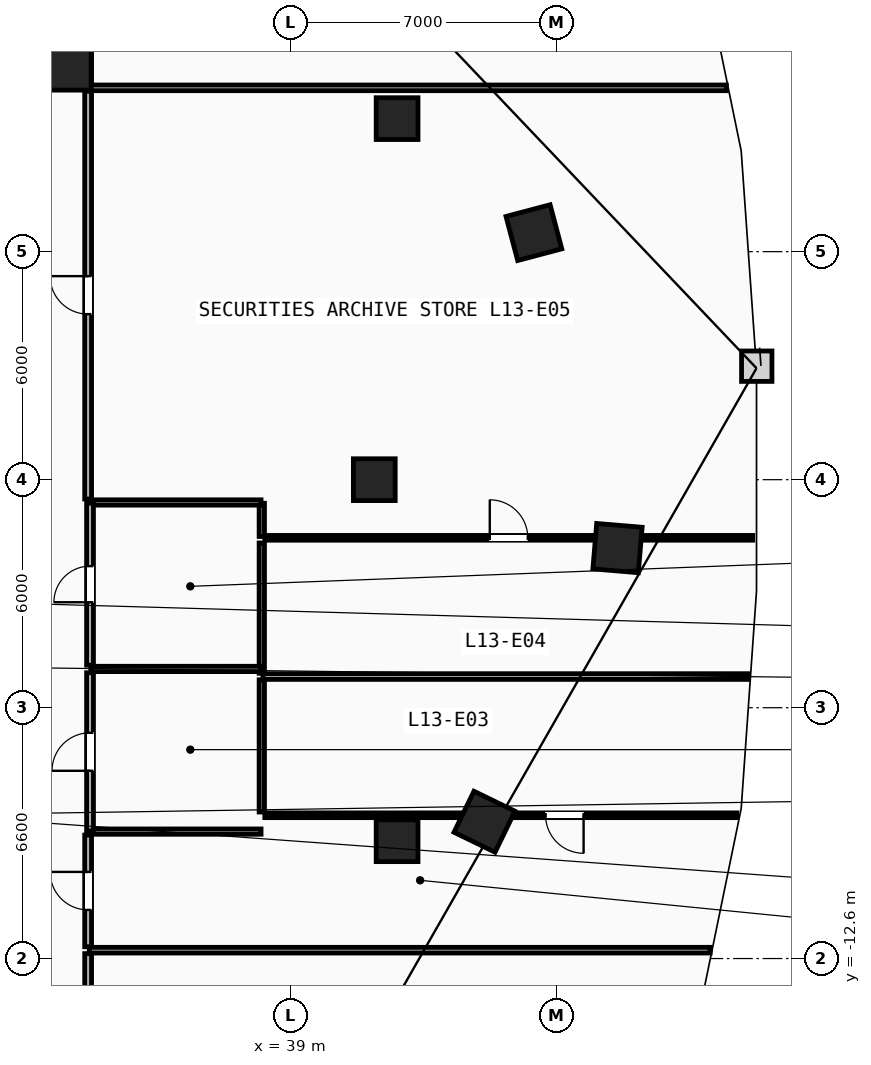
"""IFC4 building model, lengths in metres.
Left out: names, types, materials, properties, quantities, classifications, styles, units other than length and angle.
Written with IfcOpenShell. Run it as: python <this file> out.ifc"""

import sys

from ifc_helpers import new_model, si_unit, direction, frame, frame_2d, origin, origin_2d, place, context, subcontext, project, spatial, rectangle, extrude, element, fill, save


model = new_model("IFC4")
c1 = context("Model", 3, precision=1e-05, world=origin(), true_north=direction((0.0, 1.0)))
c2 = subcontext(c1, "Body", "Model", "MODEL_VIEW")
j1 = project(units=[si_unit("LENGTHUNIT", "METRE"), si_unit("PLANEANGLEUNIT", "RADIAN")], contexts=[c1])
p1 = place(None, origin())
s1 = spatial("IfcSite", under=j1, at=p1, CompositionType="ELEMENT")
p2 = place(p1, origin())
s2 = spatial("IfcBuilding", under=s1, at=p2, CompositionType="ELEMENT")
p3 = place(p2, frame((0.0, 0.0, 54.4)))
s3 = spatial("IfcBuildingStorey", under=s2, at=p3, CompositionType="ELEMENT", Elevation=54.4)
for number, where, z_axis, x_axis in (
    (1, (41.2, 0.0, 0.0), (0.0, 0.0, 1.0), (1.0, 0.0, 0.0)),
    (2, (41.8, -9.5, 0.0), (0.0, 0.0, 1.0), (1.0, 0.0, 0.0)),
    (3, (41.8, 9.5, 0.0), (0.0, 0.0, 1.0), (1.0, 0.0, 0.0)),
    (4, (33.2, 10.8, 0.0), (0.0, 0.0, 1.0), (1.0, 0.0, 0.0)),
):
    element("IfcColumn", number, at=place(p3, frame(where, z_axis=z_axis, x_axis=x_axis)), inside=s3, PredefinedType="COLUMN", context=c2, shape_type="SweptSolid", body=[
        extrude(rectangle(XDim=1.1, YDim=1.1, at=origin_2d()), origin(), (0.0, 0.0, 1.0), 3.8),
    ])
for number, where, z_axis, x_axis in (
    (5, (44.1, -9.0, 0.0), (0.0, 0.0, 1.0), (0.437, 0.899, 0.0)),
    (6, (47.6, -1.8, 0.0), (0.0, 0.0, 1.0), (0.084, 0.997, 0.0)),
    (7, (45.4, 6.5, 0.0), (0.0, 0.0, 1.0), (-0.256, 0.967, 0.0)),
):
    element("IfcColumn", number, at=place(p3, frame(where, z_axis=z_axis, x_axis=x_axis)), inside=s3, PredefinedType="COLUMN", context=c2, shape_type="SweptSolid", body=[
        extrude(rectangle(XDim=1.2, YDim=1.2, at=origin_2d()), origin(), (0.0, 0.0, 1.0), 3.8),
    ])
p4 = place(p3, frame((38.24, -8.745, 0.0), z_axis=(0.0, 0.0, 1.0), x_axis=(0.0, 1.0, 0.0)))
e8 = element("IfcWall", 8, at=p4, inside=s3, PredefinedType="PARTITIONING", context=c2, shape_type="SweptSolid", body=[
    extrude(rectangle(XDim=3.48, YDim=0.14, at=frame_2d((1.74, 0.0))), origin(), (0.0, 0.0, 1.0), 3.5),
])
p5 = place(p3, frame((38.24, -5.095, 0.0), z_axis=(0.0, 0.0, 1.0), x_axis=(0.0, 1.0, 0.0)))
e9 = element("IfcWall", 9, at=p5, inside=s3, PredefinedType="PARTITIONING", context=c2, shape_type="SweptSolid", body=[
    extrude(rectangle(XDim=3.43, YDim=0.14, at=frame_2d((1.715, 0.0))), origin(), (0.0, 0.0, 1.0), 3.5),
])
p6 = place(p3, frame((38.24, -1.495, 0.0), z_axis=(0.0, 0.0, 1.0), x_axis=(0.0, 1.0, 0.0)))
e10 = element("IfcWall", 10, at=p6, inside=s3, PredefinedType="PARTITIONING", context=c2, shape_type="SweptSolid", body=[
    extrude(rectangle(XDim=0.875, YDim=0.14, at=frame_2d((0.438, 0.0))), origin(), (0.0, 0.0, 1.0), 3.5),
])
for number, where, z_axis, x_axis in (
    (11, (33.74, -0.6, 0.0), (0.0, 0.0, 1.0), (1.0, 0.0, 0.0)),
    (12, (33.74, -4.98, 0.0), (0.0, 0.0, 1.0), (1.0, 0.0, 0.0)),
    (13, (33.74, -9.26, 0.0), (0.0, 0.0, 1.0), (1.0, 0.0, 0.0)),
):
    element("IfcWall", number, at=place(p3, frame(where, z_axis=z_axis, x_axis=x_axis)), inside=s3, PredefinedType="PARTITIONING", context=c2, shape_type="SweptSolid", body=[
        extrude(rectangle(XDim=4.48, YDim=0.14, at=frame_2d((2.24, 0.0))), origin(), (0.0, 0.0, 1.0), 3.5),
    ])
p7 = place(p3, frame((33.72, -4.88, 0.0), z_axis=(0.0, 0.0, 1.0), x_axis=(0.0, 1.0, 0.0)))
e14 = element("IfcWall", 14, at=p7, inside=s3, PredefinedType="PARTITIONING", context=c2, shape_type="SweptSolid", body=[
    extrude(rectangle(XDim=4.26, YDim=0.18, at=frame_2d((2.13, 0.0))), origin(), (0.0, 0.0, 1.0), 3.5),
])
p8 = place(p7, frame((1.655, 0.0, 0.0)))
e15 = element("IfcOpeningElement", 15, at=p8, cuts=e14, PredefinedType="OPENING", context=c2, shape_type="SweptSolid", body=[
    extrude(rectangle(XDim=0.95, YDim=2.1, at=frame_2d((0.475, 1.05))), frame((0.0, 0.1, 0.0), z_axis=(0.0, -1.0, 0.0), x_axis=(1.0, 0.0, 0.0)), (0.0, 0.0, 1.0), 0.2),
])
p9 = place(p3, frame((33.72, -9.24, 0.0), z_axis=(0.0, 0.0, 1.0), x_axis=(0.0, 1.0, 0.0)))
e16 = element("IfcWall", 16, at=p9, inside=s3, PredefinedType="PARTITIONING", context=c2, shape_type="SweptSolid", body=[
    extrude(rectangle(XDim=4.16, YDim=0.18, at=frame_2d((2.08, 0.0))), origin(), (0.0, 0.0, 1.0), 3.5),
])
p10 = place(p9, frame((1.58, 0.0, 0.0)))
e17 = element("IfcOpeningElement", 17, at=p10, cuts=e16, PredefinedType="OPENING", context=c2, shape_type="SweptSolid", body=[
    extrude(rectangle(XDim=1.0, YDim=2.15, at=frame_2d((0.5, 1.075))), frame((0.0, 0.1, 0.0), z_axis=(0.0, -1.0, 0.0), x_axis=(1.0, 0.0, 0.0)), (0.0, 0.0, 1.0), 0.2),
])
p11 = place(p3, frame((33.7, 10.31, 0.0), z_axis=(0.0, 0.0, 1.0), x_axis=(1.0, 0.0, 0.0)))
e18 = element("IfcWall", 18, at=p11, inside=s3, PredefinedType="PARTITIONING", context=c2, shape_type="SweptSolid", body=[
    extrude(rectangle(XDim=16.764, YDim=0.15, at=frame_2d((8.382, 0.0))), origin(), (0.0, 0.0, 1.0), 2.805),
])
p12 = place(p3, frame((38.27, -5.18, 0.0), z_axis=(0.0, 0.0, 1.0), x_axis=(1.0, 0.0, 0.0)))
e19 = element("IfcWall", 19, at=p12, inside=s3, PredefinedType="PARTITIONING", context=c2, shape_type="SweptSolid", body=[
    extrude(rectangle(XDim=12.78, YDim=0.15, at=frame_2d((6.39, 0.0))), origin(), (0.0, 0.0, 1.0), 3.5),
])
p13 = place(p3, frame((33.7, -12.38, 0.0), z_axis=(0.0, 0.0, 1.0), x_axis=(1.0, 0.0, 0.0)))
e20 = element("IfcWall", 20, at=p13, inside=s3, PredefinedType="PARTITIONING", context=c2, shape_type="SweptSolid", body=[
    extrude(rectangle(XDim=16.338, YDim=0.15, at=frame_2d((8.169, 0.0))), origin(), (0.0, 0.0, 1.0), 3.5),
])
p14 = place(p3, frame((33.67, -12.29, 0.0), z_axis=(0.0, 0.0, 1.0), x_axis=(0.0, 1.0, 0.0)))
e21 = element("IfcWall", 21, at=p14, inside=s3, PredefinedType="PARTITIONING", context=c2, shape_type="SweptSolid", body=[
    extrude(rectangle(XDim=2.939, YDim=0.18, at=frame_2d((1.469, 0.0))), origin(), (0.0, 0.0, 1.0), 3.5),
])
p15 = place(p14, frame((0.969, 0.0, 0.0)))
e22 = element("IfcOpeningElement", 22, at=p15, cuts=e21, PredefinedType="OPENING", context=c2, shape_type="SweptSolid", body=[
    extrude(rectangle(XDim=1.0, YDim=2.15, at=frame_2d((0.5, 1.075))), frame((0.0, 0.1, 0.0), z_axis=(0.0, -1.0, 0.0), x_axis=(1.0, 0.0, 0.0)), (0.0, 0.0, 1.0), 0.2),
])
p16 = place(p3, frame((33.67, -17.428, 0.0), z_axis=(0.0, 0.0, 1.0), x_axis=(0.0, 1.0, 0.0)))
e23 = element("IfcWall", 23, at=p16, inside=s3, PredefinedType="PARTITIONING", context=c2, shape_type="SweptSolid", body=[
    extrude(rectangle(XDim=4.958, YDim=0.18, at=frame_2d((2.479, 0.0))), origin(), (0.0, 0.0, 1.0), 3.5),
])
p17 = place(p3, frame((33.67, -0.509, 0.0), z_axis=(0.0, 0.0, 1.0), x_axis=(0.0, 1.0, 0.0)))
e24 = element("IfcWall", 24, at=p17, inside=s3, PredefinedType="PARTITIONING", context=c2, shape_type="SweptSolid", body=[
    extrude(rectangle(XDim=10.729, YDim=0.18, at=frame_2d((5.364, 0.0))), origin(), (0.0, 0.0, 1.0), 3.5),
])
p18 = place(p17, frame((4.864, 0.0, 0.0)))
e25 = element("IfcOpeningElement", 25, at=p18, cuts=e24, PredefinedType="OPENING", context=c2, shape_type="SweptSolid", body=[
    extrude(rectangle(XDim=1.0, YDim=2.15, at=frame_2d((0.5, 1.075))), frame((0.0, 0.1, 0.0), z_axis=(0.0, -1.0, 0.0), x_axis=(1.0, 0.0, 0.0)), (0.0, 0.0, 1.0), 0.2),
])
p19 = place(p3, frame((33.67, 10.4, 0.0), z_axis=(0.0, 0.0, 1.0), x_axis=(0.0, 1.0, 0.0)))
e26 = element("IfcWall", 26, at=p19, inside=s3, PredefinedType="PARTITIONING", context=c2, shape_type="SweptSolid", body=[
    extrude(rectangle(XDim=1.0, YDim=0.18, at=frame_2d((0.5, 0.0))), origin(), (0.0, 0.0, 1.0), 3.5),
])
p20 = place(p3, frame((50.742, -8.83, 0.0), z_axis=(0.0, 0.0, 1.0), x_axis=(-1.0, 0.0, 0.0)))
e27 = element("IfcWall", 27, at=p20, inside=s3, PredefinedType="PARTITIONING", context=c2, shape_type="SweptSolid", body=[
    extrude(rectangle(XDim=12.422, YDim=0.125, at=frame_2d((6.211, 0.0))), origin(), (0.0, 0.0, 1.0), 3.5),
])
p21 = place(p20, frame((4.034, 0.0, 0.0)))
e28 = element("IfcOpeningElement", 28, at=p21, cuts=e27, PredefinedType="OPENING", context=c2, shape_type="SweptSolid", body=[
    extrude(rectangle(XDim=1.0, YDim=2.15, at=frame_2d((0.5, 1.075))), frame((0.0, 0.073, 0.0), z_axis=(0.0, -1.0, 0.0), x_axis=(1.0, 0.0, 0.0)), (0.0, 0.0, 1.0), 0.145),
])
p22 = place(p3, frame((38.32, -1.53, 0.0), z_axis=(0.0, 0.0, 1.0), x_axis=(1.0, 0.0, 0.0)))
e29 = element("IfcWall", 29, at=p22, inside=s3, PredefinedType="PARTITIONING", context=c2, shape_type="SweptSolid", body=[
    extrude(rectangle(XDim=12.838, YDim=0.125, at=frame_2d((6.419, 0.0))), origin(), (0.0, 0.0, 1.0), 2.967),
])
p23 = place(p22, frame((5.919, 0.0, 0.0)))
e30 = element("IfcOpeningElement", 30, at=p23, cuts=e29, PredefinedType="OPENING", context=c2, shape_type="SweptSolid", body=[
    extrude(rectangle(XDim=1.0, YDim=2.15, at=frame_2d((0.5, 1.075))), frame((0.0, 0.073, 0.0), z_axis=(0.0, -1.0, 0.0), x_axis=(1.0, 0.0, 0.0)), (0.0, 0.0, 1.0), 0.145),
])
p24 = place(p23, origin())
e31 = element("IfcDoor", 31, at=p24, inside=s3, OperationType="SINGLE_SWING_LEFT", PredefinedType="DOOR", context=c2, shape_type="SweptSolid", body=[
    extrude(rectangle(XDim=1.0, YDim=2.15, at=frame_2d((0.5, 1.075))), frame((0.0, 0.025, 0.0), z_axis=(0.0, -1.0, 0.0), x_axis=(1.0, 0.0, 0.0)), (0.0, 0.0, 1.0), 0.05),
])
fill(e30, e31)
p25 = place(p21, origin())
e32 = element("IfcDoor", 32, at=p25, inside=s3, OperationType="SINGLE_SWING_LEFT", PredefinedType="DOOR", context=c2, shape_type="SweptSolid", body=[
    extrude(rectangle(XDim=1.0, YDim=2.15, at=frame_2d((0.5, 1.075))), frame((0.0, 0.025, 0.0), z_axis=(0.0, -1.0, 0.0), x_axis=(1.0, 0.0, 0.0)), (0.0, 0.0, 1.0), 0.05),
])
fill(e28, e32)
p26 = place(p18, origin())
e33 = element("IfcDoor", 33, at=p26, inside=s3, OperationType="SINGLE_SWING_RIGHT", PredefinedType="DOOR", context=c2, shape_type="SweptSolid", body=[
    extrude(rectangle(XDim=1.0, YDim=2.15, at=frame_2d((0.5, 1.075))), frame((0.0, 0.025, 0.0), z_axis=(0.0, -1.0, 0.0), x_axis=(1.0, 0.0, 0.0)), (0.0, 0.0, 1.0), 0.05),
])
fill(e25, e33)
p27 = place(p8, origin())
e34 = element("IfcDoor", 34, at=p27, inside=s3, OperationType="SINGLE_SWING_LEFT", PredefinedType="DOOR", context=c2, shape_type="SweptSolid", body=[
    extrude(rectangle(XDim=0.95, YDim=2.1, at=frame_2d((0.475, 1.05))), frame((0.0, 0.025, 0.0), z_axis=(0.0, -1.0, 0.0), x_axis=(1.0, 0.0, 0.0)), (0.0, 0.0, 1.0), 0.05),
])
fill(e15, e34)
p28 = place(p10, origin())
e35 = element("IfcDoor", 35, at=p28, inside=s3, OperationType="SINGLE_SWING_LEFT", PredefinedType="DOOR", context=c2, shape_type="SweptSolid", body=[
    extrude(rectangle(XDim=1.0, YDim=2.15, at=frame_2d((0.5, 1.075))), frame((0.0, 0.025, 0.0), z_axis=(0.0, -1.0, 0.0), x_axis=(1.0, 0.0, 0.0)), (0.0, 0.0, 1.0), 0.05),
])
fill(e17, e35)
p29 = place(p15, origin())
e36 = element("IfcDoor", 36, at=p29, inside=s3, OperationType="SINGLE_SWING_RIGHT", PredefinedType="DOOR", context=c2, shape_type="SweptSolid", body=[
    extrude(rectangle(XDim=1.0, YDim=2.15, at=frame_2d((0.5, 1.075))), frame((0.0, 0.025, 0.0), z_axis=(0.0, -1.0, 0.0), x_axis=(1.0, 0.0, 0.0)), (0.0, 0.0, 1.0), 0.05),
])
fill(e22, e36)
save(model, sys.argv[1])
